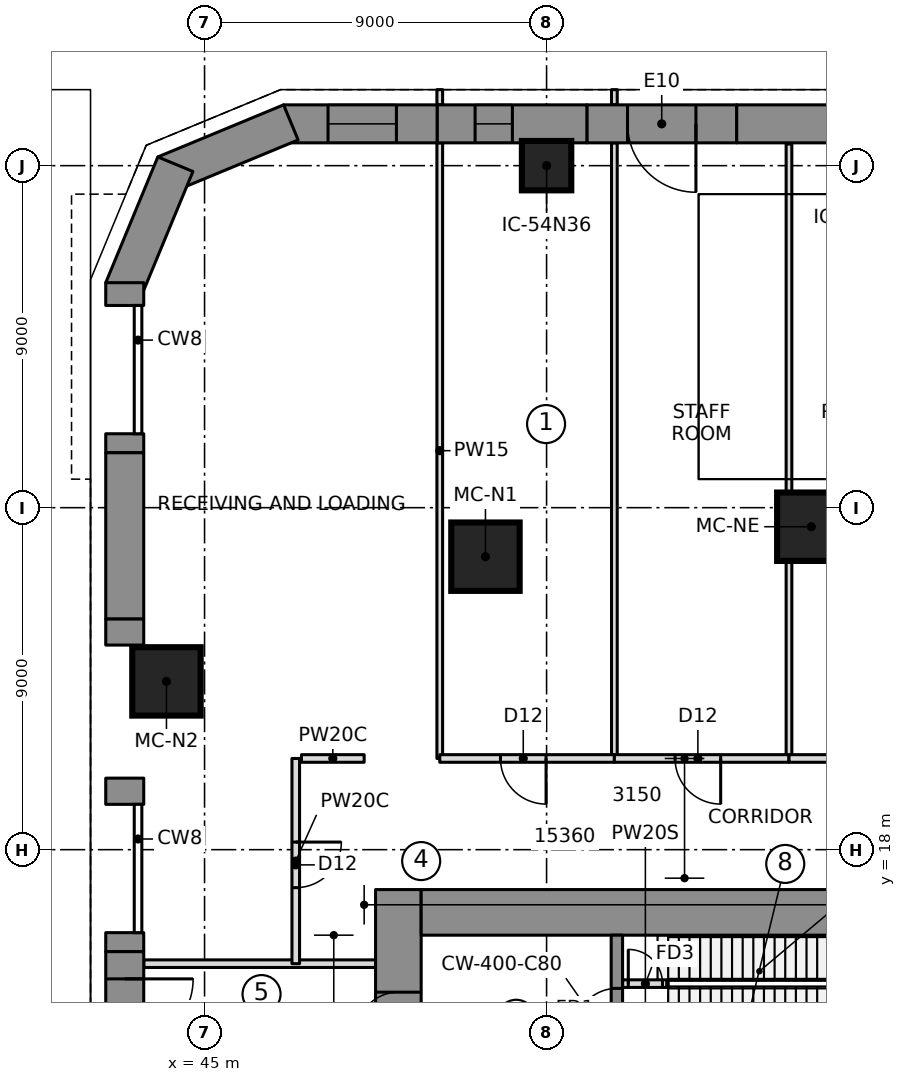
"""IFC4 building model, lengths in metres.
Left out: names, types, materials, properties, quantities, classifications, styles, units other than length and angle.
Written with IfcOpenShell. Run it as: python <this file> out.ifc"""

import sys

from ifc_helpers import new_model, si_unit, direction, frame, frame_2d, origin, origin_2d, place, context, subcontext, project, spatial, polyline, rectangle, outline, extrude, element, fill, save


model = new_model("IFC4")
c1 = context("Model", 3, precision=1e-05, world=origin(), true_north=direction((0.0, 1.0)))
c2 = subcontext(c1, "Body", "Model", "MODEL_VIEW")
j1 = project(units=[si_unit("LENGTHUNIT", "METRE"), si_unit("PLANEANGLEUNIT", "RADIAN")], contexts=[c1])
p1 = place(None, origin())
s1 = spatial("IfcSite", under=j1, at=p1, CompositionType="ELEMENT")
p2 = place(p1, origin())
s2 = spatial("IfcBuilding", under=s1, at=p2, CompositionType="ELEMENT")
p3 = place(p2, origin())
s3 = spatial("IfcBuildingStorey", under=s2, at=p3, CompositionType="ELEMENT", Elevation=0.0)
p4 = place(p3, frame((50.1, 6.65, 0.0), z_axis=(0.0, 0.0, 1.0), x_axis=(0.0, 1.0, 0.0)))
e1 = element("IfcWall", 1, at=p4, inside=s3, PredefinedType="SHEAR", context=c2, shape_type="SweptSolid", body=[
    extrude(rectangle(XDim=10.3, YDim=1.2, at=frame_2d((5.15, 0.0))), origin(), (0.0, 0.0, 1.0), 8.0),
])
p5 = place(p4, frame((6.5, 0.0, 0.0)))
e2 = element("IfcOpeningElement", 2, at=p5, cuts=e1, PredefinedType="OPENING", context=c2, shape_type="SweptSolid", body=[
    extrude(rectangle(XDim=1.1, YDim=2.1, at=frame_2d((0.55, 1.05))), frame((0.0, 0.61, 0.0), z_axis=(0.0, -1.0, 0.0), x_axis=(1.0, 0.0, 0.0)), (0.0, 0.0, 1.0), 1.22),
])
p6 = place(p3, frame((50.7, 16.35, 0.0), z_axis=(0.0, 0.0, 1.0), x_axis=(1.0, 0.0, 0.0)))
e3 = element("IfcWall", 3, at=p6, inside=s3, PredefinedType="SHEAR", context=c2, shape_type="SweptSolid", body=[
    extrude(rectangle(XDim=15.06, YDim=1.2, at=frame_2d((7.53, 0.0))), origin(), (0.0, 0.0, 1.0), 8.0),
])
p7 = place(p3, frame((55.85, 10.35, 0.0), z_axis=(0.0, 0.0, 1.0), x_axis=(0.0, 1.0, 0.0)))
e4 = element("IfcWall", 4, at=p7, inside=s3, PredefinedType="SHEAR", context=c2, shape_type="SweptSolid", body=[
    extrude(rectangle(XDim=5.4, YDim=0.3, at=frame_2d((2.7, 0.0))), origin(), (0.0, 0.0, 1.0), 8.0),
])
p8 = place(p7, frame((0.05, 0.0, 0.0)))
e5 = element("IfcOpeningElement", 5, at=p8, cuts=e4, PredefinedType="OPENING", context=c2, shape_type="SweptSolid", body=[
    extrude(rectangle(XDim=1.1, YDim=2.1, at=frame_2d((0.55, 1.05))), frame((0.0, 0.16, 0.0), z_axis=(0.0, -1.0, 0.0), x_axis=(1.0, 0.0, 0.0)), (0.0, 0.0, 1.0), 0.32),
])
p9 = place(p7, frame((2.9, 0.0, 0.0)))
e6 = element("IfcOpeningElement", 6, at=p9, cuts=e4, PredefinedType="OPENING", context=c2, shape_type="SweptSolid", body=[
    extrude(rectangle(XDim=1.1, YDim=2.1, at=frame_2d((0.55, 1.05))), frame((0.0, 0.16, 0.0), z_axis=(0.0, -1.0, 0.0), x_axis=(1.0, 0.0, 0.0)), (0.0, 0.0, 1.0), 0.32),
])
for number, where, z_axis, x_axis in (
    (7, (60.966, 26.499, 0.0), (0.0, 0.0, 1.0), (1.0, 0.0, 0.0)),
    (8, (52.392, 25.71, 0.0), (0.0, 0.0, 1.0), (1.0, 0.0, 0.0)),
    (9, (43.998, 22.428, 0.0), (0.0, 0.0, 1.0), (1.0, 0.0, 0.0)),
):
    element("IfcColumn", number, at=place(p3, frame(where, z_axis=z_axis, x_axis=x_axis)), inside=s3, PredefinedType="COLUMN", context=c2, shape_type="SweptSolid", body=[
        extrude(rectangle(XDim=1.8, YDim=1.8, at=origin_2d()), origin(), (0.0, 0.0, 1.0), 8.0),
    ])
p10 = place(p3, frame((54.0, 36.0, 0.0), z_axis=(0.0, 0.0, 1.0), x_axis=(1.0, 0.0, 0.0)))
e10 = element("IfcColumn", 10, at=p10, inside=s3, PredefinedType="COLUMN", context=c2, shape_type="SweptSolid", body=[
    extrude(rectangle(XDim=1.3, YDim=1.3, at=origin_2d()), origin(), (0.0, 0.0, 1.0), 8.0),
])
p11 = place(p2, frame((0.0, 0.0, -10.0)))
s4 = spatial("IfcBuildingStorey", under=s2, at=p11, CompositionType="ELEMENT", Elevation=-10.0)
p12 = place(p11, frame((41.69, 21.429, -0.3), z_axis=(0.0, 0.0, 1.0), x_axis=(0.888406364692, 0.459057873449, 0.0)))
e11 = element("IfcWall", 11, at=p12, inside=s4, PredefinedType="SHEAR", context=c2, shape_type="SweptSolid", body=[
    extrude(rectangle(XDim=1.529, YDim=3.4, at=frame_2d((0.764, 0.0))), origin(), (0.0, 0.0, 1.0), 15.3),
])
p13 = place(p3, frame((62.94, 37.1, 0.0), z_axis=(0.0, 0.0, 1.0), x_axis=(-1.0, 0.0, 0.0)))
e12 = element("IfcWall", 12, at=p13, inside=s3, PredefinedType="NOTDEFINED", context=c2, shape_type="SweptSolid", body=[
    extrude(outline(polyline([(0.0, -0.5), (3.94, -0.5), (3.94, 0.5), (0.0, 0.5), (0.0, -0.5)])), origin(), (0.0, 0.0, 1.0), 7.7),
])
p14 = place(p3, frame((59.0, 37.1, 0.0), z_axis=(0.0, 0.0, 1.0), x_axis=(-1.0, 0.0, 0.0)))
e13 = element("IfcWall", 13, at=p14, inside=s3, PredefinedType="NOTDEFINED", context=c2, shape_type="SweptSolid", body=[
    extrude(outline(polyline([(0.0, -0.5), (3.94, -0.5), (3.94, 0.5), (0.0, 0.5), (0.0, -0.5)])), origin(), (0.0, 0.0, 1.0), 7.7),
])
p15 = place(p14, frame((1.07, 0.0, 0.0)))
e14 = element("IfcOpeningElement", 14, at=p15, cuts=e13, PredefinedType="OPENING", context=c2, shape_type="SweptSolid", body=[
    extrude(rectangle(XDim=1.8, YDim=2.4, at=frame_2d((0.9, 1.2))), frame((0.0, 0.51, 0.0), z_axis=(0.0, -1.0, 0.0), x_axis=(1.0, 0.0, 0.0)), (0.0, 0.0, 1.0), 1.02),
])
p16 = place(p3, frame((55.06, 37.1, 0.0), z_axis=(0.0, 0.0, 1.0), x_axis=(-1.0, 0.0, 0.0)))
e15 = element("IfcWall", 15, at=p16, inside=s3, PredefinedType="NOTDEFINED", context=c2, shape_type="SweptSolid", body=[
    extrude(outline(polyline([(0.0, -0.5), (3.94, -0.5), (3.94, 0.5), (0.0, 0.5), (0.0, -0.5)])), origin(), (0.0, 0.0, 1.0), 7.7),
])
p17 = place(p16, frame((1.96, 0.0, 0.9)))
e16 = element("IfcOpeningElement", 16, at=p17, cuts=e15, PredefinedType="OPENING", context=c2, shape_type="SweptSolid", body=[
    extrude(rectangle(XDim=0.981, YDim=2.4, at=frame_2d((0.49, 1.2))), frame((0.0, 0.51, 0.0), z_axis=(0.0, -1.0, 0.0), x_axis=(1.0, 0.0, 0.0)), (0.0, 0.0, 1.0), 1.02),
])
p18 = place(p3, frame((51.119, 37.1, 0.0), z_axis=(0.0, 0.0, 1.0), x_axis=(-1.0, 0.0, 0.0)))
e17 = element("IfcWall", 17, at=p18, inside=s3, PredefinedType="NOTDEFINED", context=c2, shape_type="SweptSolid", body=[
    extrude(outline(polyline([(0.0, -0.5), (4.04, -0.5), (3.841, 0.5), (0.0, 0.5), (0.0, -0.5)])), origin(), (0.0, 0.0, 1.0), 7.7),
])
p19 = place(p18, frame((1.07, 0.0, 0.9)))
e18 = element("IfcOpeningElement", 18, at=p19, cuts=e17, PredefinedType="OPENING", context=c2, shape_type="SweptSolid", body=[
    extrude(rectangle(XDim=1.8, YDim=2.4, at=frame_2d((0.9, 1.2))), frame((0.0, 0.51, 0.0), z_axis=(0.0, -1.0, 0.0), x_axis=(1.0, 0.0, 0.0)), (0.0, 0.0, 1.0), 1.02),
])
p20 = place(p3, frame((47.179, 37.1, 0.0), z_axis=(0.0, 0.0, 1.0), x_axis=(-0.923862365102, -0.382724875529, 0.0)))
e19 = element("IfcWall", 19, at=p20, inside=s3, PredefinedType="NOTDEFINED", context=c2, shape_type="SweptSolid", body=[
    extrude(outline(polyline([(-0.1, -0.5), (3.482, -0.5), (3.068, 0.5), (0.1, 0.5), (-0.1, -0.5)])), origin(), (0.0, 0.0, 1.0), 7.7),
])
p21 = place(p3, frame((44.153, 35.847, 0.0), z_axis=(0.0, 0.0, 1.0), x_axis=(-0.382724875529, -0.923862365102, 0.0)))
e20 = element("IfcWall", 20, at=p21, inside=s3, PredefinedType="NOTDEFINED", context=c2, shape_type="SweptSolid", body=[
    extrude(outline(polyline([(-0.207, -0.5), (3.375, -0.5), (3.175, 0.5), (0.207, 0.5), (-0.207, -0.5)])), origin(), (0.0, 0.0, 1.0), 7.7),
])
p22 = place(p3, frame((42.9, 32.821, 0.0), z_axis=(0.0, 0.0, 1.0), x_axis=(0.0, -1.0, 0.0)))
e21 = element("IfcWall", 21, at=p22, inside=s3, PredefinedType="NOTDEFINED", context=c2, shape_type="SweptSolid", body=[
    extrude(outline(polyline([(-0.1, -0.5), (0.5, -0.5), (0.5, 0.5), (0.1, 0.5), (-0.1, -0.5)])), origin(), (0.0, 0.0, 1.0), 7.7),
])
p23 = place(p3, frame((42.9, 28.945, 0.0), z_axis=(0.0, 0.0, 1.0), x_axis=(0.0, -1.0, 0.0)))
e22 = element("IfcWall", 22, at=p23, inside=s3, PredefinedType="NOTDEFINED", context=c2, shape_type="SweptSolid", body=[
    extrude(outline(polyline([(0.0, -0.5), (0.5, -0.5), (0.5, 0.5), (0.0, 0.5), (0.0, -0.5)])), origin(), (0.0, 0.0, 1.0), 7.7),
])
p24 = place(p3, frame((42.9, 28.445, 0.0), z_axis=(0.0, 0.0, 1.0), x_axis=(0.0, -1.0, 0.0)))
e23 = element("IfcWall", 23, at=p24, inside=s3, PredefinedType="NOTDEFINED", context=c2, shape_type="SweptSolid", body=[
    extrude(outline(polyline([(0.0, -0.5), (4.376, -0.5), (4.376, 0.5), (0.0, 0.5), (0.0, -0.5)])), origin(), (0.0, 0.0, 1.0), 7.7),
])
p25 = place(p3, frame((42.9, 24.069, 0.0), z_axis=(0.0, 0.0, 1.0), x_axis=(0.0, -1.0, 0.0)))
e24 = element("IfcWall", 24, at=p25, inside=s3, PredefinedType="NOTDEFINED", context=c2, shape_type="SweptSolid", body=[
    extrude(outline(polyline([(0.0, -0.5), (0.685, -0.5), (2.62, 0.5), (0.0, 0.5), (0.0, -0.5)])), origin(), (0.0, 0.0, 1.0), 7.7),
])
p26 = place(p3, frame((42.9, 20.141, 0.0), z_axis=(0.0, 0.0, 1.0), x_axis=(0.0, -1.0, 0.0)))
e25 = element("IfcWall", 25, at=p26, inside=s3, PredefinedType="NOTDEFINED", context=c2, shape_type="SweptSolid", body=[
    extrude(outline(polyline([(0.258, -0.5), (0.948, -0.5), (0.948, 0.5), (-0.258, 0.5), (0.258, -0.5)])), origin(), (0.0, 0.0, 1.0), 7.7),
])
p27 = place(p3, frame((42.9, 15.816, 0.0), z_axis=(0.0, 0.0, 1.0), x_axis=(0.0, -1.0, 0.0)))
e26 = element("IfcWall", 26, at=p27, inside=s3, PredefinedType="NOTDEFINED", context=c2, shape_type="SweptSolid", body=[
    extrude(outline(polyline([(0.0, -0.5), (0.5, -0.5), (0.5, 0.5), (0.0, 0.5), (0.0, -0.5)])), origin(), (0.0, 0.0, 1.0), 7.7),
])
p28 = place(p3, frame((42.9, 15.316, 0.0), z_axis=(0.0, 0.0, 1.0), x_axis=(0.0, -1.0, 0.0)))
e27 = element("IfcWall", 27, at=p28, inside=s3, PredefinedType="NOTDEFINED", context=c2, shape_type="SweptSolid", body=[
    extrude(outline(polyline([(0.0, -0.5), (4.376, -0.5), (4.376, 0.5), (0.0, 0.5), (0.0, -0.5)])), origin(), (0.0, 0.0, 1.0), 7.7),
])
p29 = place(p28, frame((0.717, 0.0, 0.0)))
e28 = element("IfcOpeningElement", 28, at=p29, cuts=e27, PredefinedType="OPENING", context=c2, shape_type="SweptSolid", body=[
    extrude(rectangle(XDim=1.8, YDim=2.4, at=frame_2d((0.9, 1.2))), frame((0.0, 0.51, 0.0), z_axis=(0.0, -1.0, 0.0), x_axis=(1.0, 0.0, 0.0)), (0.0, 0.0, 1.0), 1.02),
])
p30 = place(p3, frame((51.189, 20.4, 0.0), z_axis=(0.0, 0.0, 1.0), x_axis=(0.0, 1.0, 0.0)))
e29 = element("IfcWall", 29, at=p30, inside=s3, PredefinedType="PARTITIONING", context=c2, shape_type="SweptSolid", body=[
    extrude(rectangle(XDim=16.2, YDim=0.15, at=frame_2d((8.1, 0.0))), origin(), (0.0, 0.0, 1.0), 7.65),
])
p31 = place(p3, frame((51.189, 37.6, 0.0), z_axis=(0.0, 0.0, 1.0), x_axis=(0.0, 1.0, 0.0)))
e30 = element("IfcWall", 30, at=p31, inside=s3, PredefinedType="PARTITIONING", context=c2, shape_type="SweptSolid", body=[
    extrude(rectangle(XDim=0.4, YDim=0.15, at=frame_2d((0.2, 0.0))), origin(), (0.0, 0.0, 1.0), 7.65),
])
p32 = place(p3, frame((55.784, 20.4, 0.0), z_axis=(0.0, 0.0, 1.0), x_axis=(0.0, 1.0, 0.0)))
e31 = element("IfcWall", 31, at=p32, inside=s3, PredefinedType="PARTITIONING", context=c2, shape_type="SweptSolid", body=[
    extrude(rectangle(XDim=16.2, YDim=0.15, at=frame_2d((8.1, 0.0))), origin(), (0.0, 0.0, 1.0), 7.65),
])
p33 = place(p3, frame((55.784, 37.6, 0.0), z_axis=(0.0, 0.0, 1.0), x_axis=(0.0, 1.0, 0.0)))
e32 = element("IfcWall", 32, at=p33, inside=s3, PredefinedType="PARTITIONING", context=c2, shape_type="SweptSolid", body=[
    extrude(rectangle(XDim=0.4, YDim=0.15, at=frame_2d((0.2, 0.0))), origin(), (0.0, 0.0, 1.0), 7.65),
])
p34 = place(p3, frame((60.378, 20.4, 0.0), z_axis=(0.0, 0.0, 1.0), x_axis=(0.0, 1.0, 0.0)))
e33 = element("IfcWall", 33, at=p34, inside=s3, PredefinedType="PARTITIONING", context=c2, shape_type="SweptSolid", body=[
    extrude(rectangle(XDim=16.17, YDim=0.15, at=frame_2d((8.085, 0.0))), origin(), (0.0, 0.0, 1.0), 7.65),
])
p35 = place(p3, frame((55.784, 20.4, 0.0), z_axis=(0.0, 0.0, 1.0), x_axis=(-1.0, 0.0, 0.0)))
e34 = element("IfcWall", 34, at=p35, inside=s3, PredefinedType="PARTITIONING", context=c2, shape_type="SweptSolid", body=[
    extrude(rectangle(XDim=4.594, YDim=0.2, at=frame_2d((2.297, 0.0))), origin(), (0.0, 0.0, 1.0), 7.65),
])
p36 = place(p35, frame((1.797, 0.0, 0.0)))
e35 = element("IfcOpeningElement", 35, at=p36, cuts=e34, PredefinedType="OPENING", context=c2, shape_type="SweptSolid", body=[
    extrude(rectangle(XDim=1.2, YDim=2.1, at=frame_2d((0.6, 1.05))), frame((0.0, 0.11, 0.0), z_axis=(0.0, -1.0, 0.0), x_axis=(1.0, 0.0, 0.0)), (0.0, 0.0, 1.0), 0.22),
])
p37 = place(p3, frame((60.378, 20.4, 0.0), z_axis=(0.0, 0.0, 1.0), x_axis=(-1.0, 0.0, 0.0)))
e36 = element("IfcWall", 36, at=p37, inside=s3, PredefinedType="PARTITIONING", context=c2, shape_type="SweptSolid", body=[
    extrude(rectangle(XDim=4.595, YDim=0.2, at=frame_2d((2.297, 0.0))), origin(), (0.0, 0.0, 1.0), 7.65),
])
p38 = place(p37, frame((1.797, 0.0, 0.0)))
e37 = element("IfcOpeningElement", 37, at=p38, cuts=e36, PredefinedType="OPENING", context=c2, shape_type="SweptSolid", body=[
    extrude(rectangle(XDim=1.2, YDim=2.1, at=frame_2d((0.6, 1.05))), frame((0.0, 0.11, 0.0), z_axis=(0.0, -1.0, 0.0), x_axis=(1.0, 0.0, 0.0)), (0.0, 0.0, 1.0), 0.22),
])
p39 = place(p3, frame((64.054, 20.4, 0.0), z_axis=(0.0, 0.0, 1.0), x_axis=(-1.0, 0.0, 0.0)))
e38 = element("IfcWall", 38, at=p39, inside=s3, PredefinedType="PARTITIONING", context=c2, shape_type="SweptSolid", body=[
    extrude(rectangle(XDim=3.676, YDim=0.2, at=frame_2d((1.838, 0.0))), origin(), (0.0, 0.0, 1.0), 7.65),
])
p40 = place(p39, frame((1.338, 0.0, 0.0)))
e39 = element("IfcOpeningElement", 39, at=p40, cuts=e38, PredefinedType="OPENING", context=c2, shape_type="SweptSolid", body=[
    extrude(rectangle(XDim=1.2, YDim=2.1, at=frame_2d((0.6, 1.05))), frame((0.0, 0.11, 0.0), z_axis=(0.0, -1.0, 0.0), x_axis=(1.0, 0.0, 0.0)), (0.0, 0.0, 1.0), 0.22),
])
p41 = place(p3, frame((43.4, 15.0, 0.0), z_axis=(0.0, 0.0, 1.0), x_axis=(1.0, 0.0, 0.0)))
e40 = element("IfcWall", 40, at=p41, inside=s3, PredefinedType="PARTITIONING", context=c2, shape_type="SweptSolid", body=[
    extrude(rectangle(XDim=6.1, YDim=0.2, at=frame_2d((3.05, 0.0))), origin(), (0.0, 0.0, 1.0), 7.65),
])
p42 = place(p3, frame((47.4, 20.4, 0.0), z_axis=(0.0, 0.0, 1.0), x_axis=(0.0, -1.0, 0.0)))
e41 = element("IfcWall", 41, at=p42, inside=s3, PredefinedType="PARTITIONING", context=c2, shape_type="SweptSolid", body=[
    extrude(rectangle(XDim=5.4, YDim=0.2, at=frame_2d((2.7, 0.0))), origin(), (0.0, 0.0, 1.0), 7.65),
])
p43 = place(p42, frame((2.2, 0.0, 0.0)))
e42 = element("IfcOpeningElement", 42, at=p43, cuts=e41, PredefinedType="OPENING", context=c2, shape_type="SweptSolid", body=[
    extrude(rectangle(XDim=1.2, YDim=2.1, at=frame_2d((0.6, 1.05))), frame((0.0, 0.11, 0.0), z_axis=(0.0, -1.0, 0.0), x_axis=(1.0, 0.0, 0.0)), (0.0, 0.0, 1.0), 0.22),
])
p44 = place(p3, frame((56.0, 14.475, 0.0), z_axis=(0.0, 0.0, 1.0), x_axis=(1.0, 0.0, 0.0)))
e43 = element("IfcWall", 43, at=p44, inside=s3, PredefinedType="PARTITIONING", context=c2, shape_type="SweptSolid", body=[
    extrude(rectangle(XDim=1.2, YDim=0.2, at=frame_2d((0.6, 0.0))), origin(), (0.0, 0.0, 1.0), 7.65),
])
p45 = place(p44, frame((0.15, 0.0, 0.0)))
e44 = element("IfcOpeningElement", 44, at=p45, cuts=e43, PredefinedType="OPENING", context=c2, shape_type="SweptSolid", body=[
    extrude(rectangle(XDim=0.9, YDim=2.1, at=frame_2d((0.45, 1.05))), frame((0.0, 0.11, 0.0), z_axis=(0.0, -1.0, 0.0), x_axis=(1.0, 0.0, 0.0)), (0.0, 0.0, 1.0), 0.22),
])
p46 = place(p3, frame((47.55, 20.4, 0.0), z_axis=(0.0, 0.0, 1.0), x_axis=(1.0, 0.0, 0.0)))
e45 = element("IfcWall", 45, at=p46, inside=s3, PredefinedType="PARTITIONING", context=c2, shape_type="SweptSolid", body=[
    extrude(rectangle(XDim=1.65, YDim=0.2, at=frame_2d((0.825, 0.0))), origin(), (0.0, 0.0, 1.0), 7.65),
])
p47 = place(p15, origin())
e46 = element("IfcDoor", 46, at=p47, inside=s3, OperationType="DOUBLE_DOOR_SINGLE_SWING", PredefinedType="DOOR", context=c2, shape_type="SweptSolid", body=[
    extrude(rectangle(XDim=1.8, YDim=2.4, at=frame_2d((0.9, 1.2))), frame((0.0, 0.495, 0.0), z_axis=(0.0, -1.0, 0.0), x_axis=(1.0, 0.0, 0.0)), (0.0, 0.0, 1.0), 0.05),
])
fill(e14, e46)
p48 = place(p17, origin())
e47 = element("IfcWindow", 47, at=p48, inside=s3, PartitioningType="SINGLE_PANEL", PredefinedType="WINDOW", context=c2, shape_type="SweptSolid", body=[
    extrude(rectangle(XDim=0.981, YDim=2.4, at=frame_2d((0.49, 1.2))), frame((0.0, 0.5, 0.0), z_axis=(0.0, -1.0, 0.0), x_axis=(1.0, 0.0, 0.0)), (0.0, 0.0, 1.0), 0.06),
])
fill(e16, e47)
p49 = place(p19, origin())
e48 = element("IfcWindow", 48, at=p49, inside=s3, PartitioningType="SINGLE_PANEL", PredefinedType="WINDOW", context=c2, shape_type="SweptSolid", body=[
    extrude(rectangle(XDim=1.8, YDim=2.4, at=frame_2d((0.9, 1.2))), frame((0.0, 0.5, 0.0), z_axis=(0.0, -1.0, 0.0), x_axis=(1.0, 0.0, 0.0)), (0.0, 0.0, 1.0), 0.06),
])
fill(e18, e48)
p50 = place(p29, origin())
e49 = element("IfcDoor", 49, at=p50, inside=s3, OperationType="DOUBLE_DOOR_SINGLE_SWING", PredefinedType="DOOR", context=c2, shape_type="SweptSolid", body=[
    extrude(rectangle(XDim=1.8, YDim=2.4, at=frame_2d((0.9, 1.2))), frame((0.0, 0.495, 0.0), z_axis=(0.0, -1.0, 0.0), x_axis=(1.0, 0.0, 0.0)), (0.0, 0.0, 1.0), 0.05),
])
fill(e28, e49)
p51 = place(p36, origin())
e50 = element("IfcDoor", 50, at=p51, inside=s3, OperationType="SINGLE_SWING_RIGHT", PredefinedType="DOOR", context=c2, shape_type="SweptSolid", body=[
    extrude(rectangle(XDim=1.2, YDim=2.1, at=frame_2d((0.6, 1.05))), frame((0.0, 0.025, 0.0), z_axis=(0.0, -1.0, 0.0), x_axis=(1.0, 0.0, 0.0)), (0.0, 0.0, 1.0), 0.05),
])
fill(e35, e50)
p52 = place(p38, origin())
e51 = element("IfcDoor", 51, at=p52, inside=s3, OperationType="SINGLE_SWING_RIGHT", PredefinedType="DOOR", context=c2, shape_type="SweptSolid", body=[
    extrude(rectangle(XDim=1.2, YDim=2.1, at=frame_2d((0.6, 1.05))), frame((0.0, 0.025, 0.0), z_axis=(0.0, -1.0, 0.0), x_axis=(1.0, 0.0, 0.0)), (0.0, 0.0, 1.0), 0.05),
])
fill(e37, e51)
p53 = place(p43, origin())
e52 = element("IfcDoor", 52, at=p53, inside=s3, OperationType="SINGLE_SWING_RIGHT", PredefinedType="DOOR", context=c2, shape_type="SweptSolid", body=[
    extrude(rectangle(XDim=1.2, YDim=2.1, at=frame_2d((0.6, 1.05))), frame((0.0, 0.025, 0.0), z_axis=(0.0, -1.0, 0.0), x_axis=(1.0, 0.0, 0.0)), (0.0, 0.0, 1.0), 0.05),
])
fill(e42, e52)
p54 = place(p45, origin())
e53 = element("IfcDoor", 53, at=p54, inside=s3, OperationType="SINGLE_SWING_LEFT", PredefinedType="DOOR", context=c2, shape_type="SweptSolid", body=[
    extrude(rectangle(XDim=0.9, YDim=2.1, at=frame_2d((0.45, 1.05))), frame((0.0, 0.025, 0.0), z_axis=(0.0, -1.0, 0.0), x_axis=(1.0, 0.0, 0.0)), (0.0, 0.0, 1.0), 0.05),
])
fill(e44, e53)
p55 = place(p9, origin())
e54 = element("IfcDoor", 54, at=p55, inside=s3, OperationType="SINGLE_SWING_RIGHT", PredefinedType="DOOR", context=c2, shape_type="SweptSolid", body=[
    extrude(rectangle(XDim=1.1, YDim=2.1, at=frame_2d((0.55, 1.05))), frame((0.0, 0.025, 0.0), z_axis=(0.0, -1.0, 0.0), x_axis=(1.0, 0.0, 0.0)), (0.0, 0.0, 1.0), 0.05),
])
fill(e6, e54)
p56 = place(p5, origin())
e55 = element("IfcDoor", 55, at=p56, inside=s3, OperationType="SINGLE_SWING_RIGHT", PredefinedType="DOOR", context=c2, shape_type="SweptSolid", body=[
    extrude(rectangle(XDim=1.1, YDim=2.1, at=frame_2d((0.55, 1.05))), frame((0.0, 0.025, 0.0), z_axis=(0.0, -1.0, 0.0), x_axis=(1.0, 0.0, 0.0)), (0.0, 0.0, 1.0), 0.05),
])
fill(e2, e55)
save(model, sys.argv[1])
